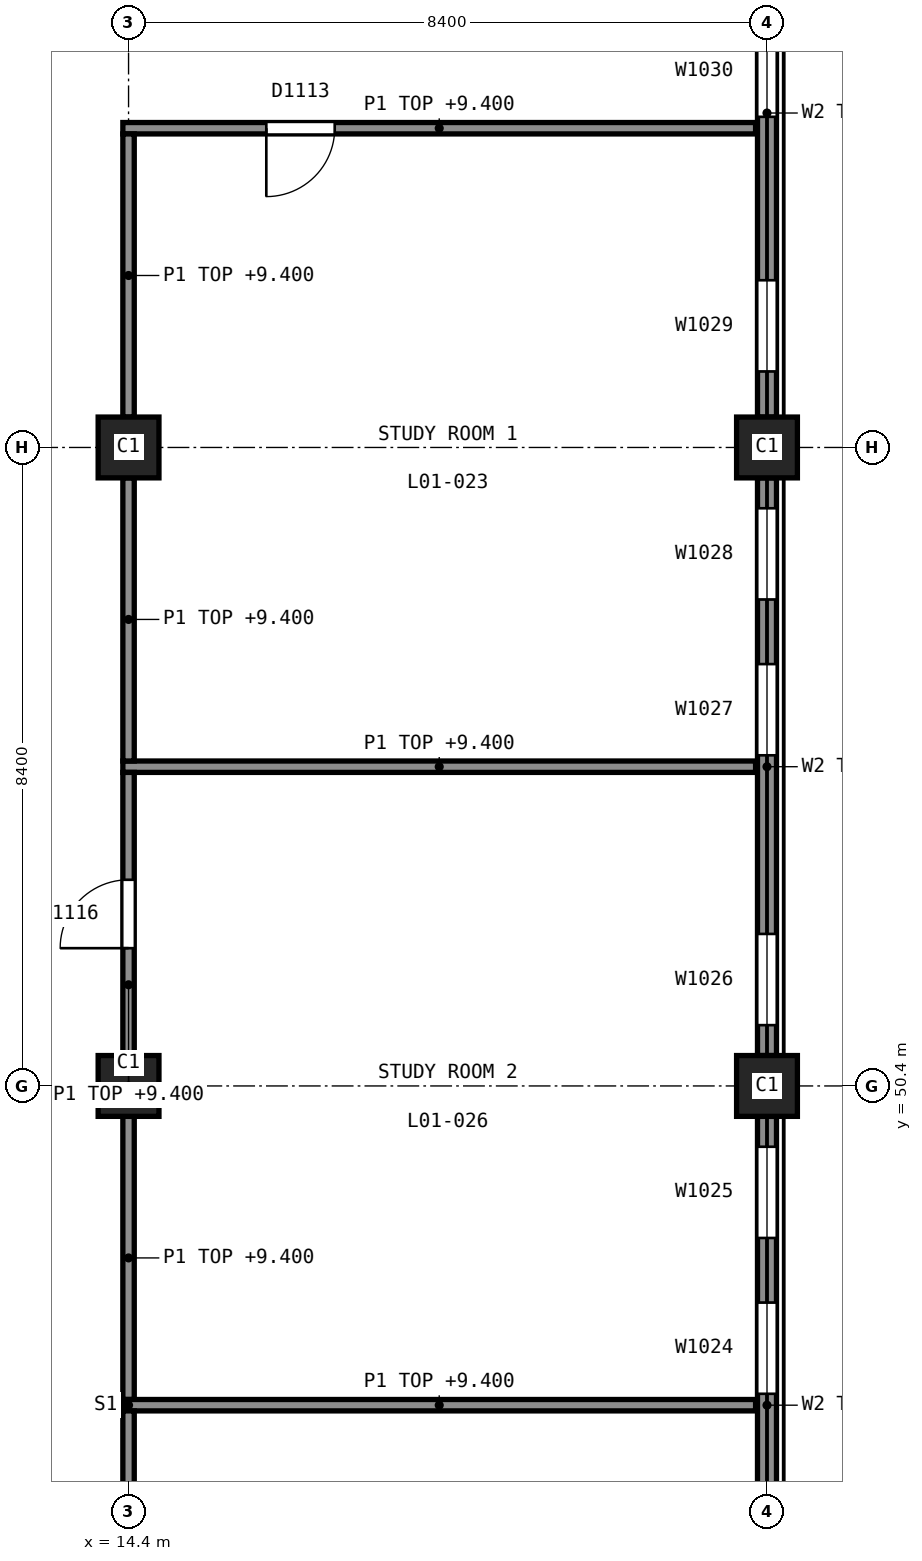
"""IFC4 building model, lengths in metres.
Left out: names, types, materials, properties, quantities, classifications, styles, units other than length and angle.
Written with IfcOpenShell. Run it as: python <this file> out.ifc"""

import sys

from ifc_helpers import new_model, si_unit, direction, frame, frame_2d, origin, origin_2d, place, context, subcontext, project, spatial, rectangle, extrude, element, fill, save


model = new_model("IFC4")
c1 = context("Model", 3, precision=1e-05, world=origin(), true_north=direction((0.0, 1.0)))
c2 = subcontext(c1, "Body", "Model", "MODEL_VIEW")
j1 = project(units=[si_unit("LENGTHUNIT", "METRE"), si_unit("PLANEANGLEUNIT", "RADIAN")], contexts=[c1])
p1 = place(None, origin())
s1 = spatial("IfcSite", under=j1, at=p1, CompositionType="ELEMENT")
p2 = place(p1, origin())
s2 = spatial("IfcBuilding", under=s1, at=p2, CompositionType="ELEMENT")
p3 = place(p2, frame((0.0, 0.0, 5.5)))
s3 = spatial("IfcBuildingStorey", under=s2, at=p3, CompositionType="ELEMENT", Elevation=5.5)
for number, where, z_axis, x_axis in (
    (1, (14.4, 50.4, 0.0), (0.0, 0.0, 1.0), (1.0, 0.0, 0.0)),
    (2, (14.4, 58.8, 0.0), (0.0, 0.0, 1.0), (1.0, 0.0, 0.0)),
    (3, (22.8, 50.4, 0.0), (0.0, 0.0, 1.0), (1.0, 0.0, 0.0)),
    (4, (22.8, 58.8, 0.0), (0.0, 0.0, 1.0), (1.0, 0.0, 0.0)),
):
    element("IfcColumn", number, at=place(p3, frame(where, z_axis=z_axis, x_axis=x_axis)), inside=s3, PredefinedType="COLUMN", context=c2, shape_type="SweptSolid", body=[
        extrude(rectangle(XDim=0.8, YDim=0.8, at=origin_2d()), origin(), (0.0, 0.0, 1.0), 5.0),
    ])
p4 = place(p3, frame((22.8, 42.4, 0.0), z_axis=(0.0, 0.0, 1.0), x_axis=(0.0, 1.0, 0.0)))
e5 = element("IfcWall", 5, at=p4, inside=s3, PredefinedType="SOLIDWALL", context=c2, shape_type="SweptSolid", body=[
    extrude(rectangle(XDim=7.6, YDim=0.25, at=frame_2d((3.8, 0.0))), origin(), (0.0, 0.0, 1.0), 3.94),
])
p5 = place(p4, frame((0.4, 0.0, 0.9)))
e6 = element("IfcOpeningElement", 6, at=p5, cuts=e5, PredefinedType="OPENING", context=c2, shape_type="SweptSolid", body=[
    extrude(rectangle(XDim=1.2, YDim=2.1, at=frame_2d((0.6, 1.05))), frame((0.0, 0.135, 0.0), z_axis=(0.0, -1.0, 0.0), x_axis=(1.0, 0.0, 0.0)), (0.0, 0.0, 1.0), 0.27),
])
p6 = place(p4, frame((3.95, 0.0, 0.9)))
e7 = element("IfcOpeningElement", 7, at=p6, cuts=e5, PredefinedType="OPENING", context=c2, shape_type="SweptSolid", body=[
    extrude(rectangle(XDim=1.2, YDim=2.1, at=frame_2d((0.6, 1.05))), frame((0.0, 0.135, 0.0), z_axis=(0.0, -1.0, 0.0), x_axis=(1.0, 0.0, 0.0)), (0.0, 0.0, 1.0), 0.27),
])
p7 = place(p4, frame((6.0, 0.0, 0.9)))
e8 = element("IfcOpeningElement", 8, at=p7, cuts=e5, PredefinedType="OPENING", context=c2, shape_type="SweptSolid", body=[
    extrude(rectangle(XDim=1.2, YDim=2.1, at=frame_2d((0.6, 1.05))), frame((0.0, 0.135, 0.0), z_axis=(0.0, -1.0, 0.0), x_axis=(1.0, 0.0, 0.0)), (0.0, 0.0, 1.0), 0.27),
])
p8 = place(p3, frame((22.8, 50.8, 0.0), z_axis=(0.0, 0.0, 1.0), x_axis=(0.0, 1.0, 0.0)))
e9 = element("IfcWall", 9, at=p8, inside=s3, PredefinedType="SOLIDWALL", context=c2, shape_type="SweptSolid", body=[
    extrude(rectangle(XDim=7.6, YDim=0.25, at=frame_2d((3.8, 0.0))), origin(), (0.0, 0.0, 1.0), 3.94),
])
p9 = place(p8, frame((0.4, 0.0, 0.9)))
e10 = element("IfcOpeningElement", 10, at=p9, cuts=e9, PredefinedType="OPENING", context=c2, shape_type="SweptSolid", body=[
    extrude(rectangle(XDim=1.2, YDim=2.1, at=frame_2d((0.6, 1.05))), frame((0.0, 0.135, 0.0), z_axis=(0.0, -1.0, 0.0), x_axis=(1.0, 0.0, 0.0)), (0.0, 0.0, 1.0), 0.27),
])
p10 = place(p8, frame((3.95, 0.0, 0.9)))
e11 = element("IfcOpeningElement", 11, at=p10, cuts=e9, PredefinedType="OPENING", context=c2, shape_type="SweptSolid", body=[
    extrude(rectangle(XDim=1.2, YDim=2.1, at=frame_2d((0.6, 1.05))), frame((0.0, 0.135, 0.0), z_axis=(0.0, -1.0, 0.0), x_axis=(1.0, 0.0, 0.0)), (0.0, 0.0, 1.0), 0.27),
])
p11 = place(p8, frame((6.0, 0.0, 0.9)))
e12 = element("IfcOpeningElement", 12, at=p11, cuts=e9, PredefinedType="OPENING", context=c2, shape_type="SweptSolid", body=[
    extrude(rectangle(XDim=1.2, YDim=2.1, at=frame_2d((0.6, 1.05))), frame((0.0, 0.135, 0.0), z_axis=(0.0, -1.0, 0.0), x_axis=(1.0, 0.0, 0.0)), (0.0, 0.0, 1.0), 0.27),
])
p12 = place(p3, frame((22.8, 59.2, 0.0), z_axis=(0.0, 0.0, 1.0), x_axis=(0.0, 1.0, 0.0)))
e13 = element("IfcWall", 13, at=p12, inside=s3, PredefinedType="SOLIDWALL", context=c2, shape_type="SweptSolid", body=[
    extrude(rectangle(XDim=8.0, YDim=0.25, at=frame_2d((4.0, 0.0))), origin(), (0.0, 0.0, 1.0), 3.94),
])
p13 = place(p12, frame((0.6, 0.0, 0.9)))
e14 = element("IfcOpeningElement", 14, at=p13, cuts=e13, PredefinedType="OPENING", context=c2, shape_type="SweptSolid", body=[
    extrude(rectangle(XDim=1.2, YDim=2.1, at=frame_2d((0.6, 1.05))), frame((0.0, 0.135, 0.0), z_axis=(0.0, -1.0, 0.0), x_axis=(1.0, 0.0, 0.0)), (0.0, 0.0, 1.0), 0.27),
])
p14 = place(p12, frame((3.95, 0.0, 0.9)))
e15 = element("IfcOpeningElement", 15, at=p14, cuts=e13, PredefinedType="OPENING", context=c2, shape_type="SweptSolid", body=[
    extrude(rectangle(XDim=1.2, YDim=2.1, at=frame_2d((0.6, 1.05))), frame((0.0, 0.135, 0.0), z_axis=(0.0, -1.0, 0.0), x_axis=(1.0, 0.0, 0.0)), (0.0, 0.0, 1.0), 0.27),
])
p15 = place(p12, frame((6.2, 0.0, 0.9)))
e16 = element("IfcOpeningElement", 16, at=p15, cuts=e13, PredefinedType="OPENING", context=c2, shape_type="SweptSolid", body=[
    extrude(rectangle(XDim=1.2, YDim=2.1, at=frame_2d((0.6, 1.05))), frame((0.0, 0.135, 0.0), z_axis=(0.0, -1.0, 0.0), x_axis=(1.0, 0.0, 0.0)), (0.0, 0.0, 1.0), 0.27),
])
p16 = place(p3, frame((14.325, 54.6, 0.0), z_axis=(0.0, 0.0, 1.0), x_axis=(1.0, 0.0, 0.0)))
e17 = element("IfcWall", 17, at=p16, inside=s3, PredefinedType="PARTITIONING", context=c2, shape_type="SweptSolid", body=[
    extrude(rectangle(XDim=8.325, YDim=0.15, at=frame_2d((4.163, 0.0))), origin(), (0.0, 0.0, 1.0), 3.9),
])
p17 = place(p3, frame((14.325, 63.0, 0.0), z_axis=(0.0, 0.0, 1.0), x_axis=(1.0, 0.0, 0.0)))
e18 = element("IfcWall", 18, at=p17, inside=s3, PredefinedType="PARTITIONING", context=c2, shape_type="SweptSolid", body=[
    extrude(rectangle(XDim=8.325, YDim=0.15, at=frame_2d((4.163, 0.0))), origin(), (0.0, 0.0, 1.0), 3.9),
])
p18 = place(p17, frame((1.887, 0.0, 0.0)))
e19 = element("IfcOpeningElement", 19, at=p18, cuts=e18, PredefinedType="OPENING", context=c2, shape_type="SweptSolid", body=[
    extrude(rectangle(XDim=0.9, YDim=2.1, at=frame_2d((0.45, 1.05))), frame((0.0, 0.085, 0.0), z_axis=(0.0, -1.0, 0.0), x_axis=(1.0, 0.0, 0.0)), (0.0, 0.0, 1.0), 0.17),
])
p19 = place(p3, frame((14.4, 54.675, 0.0), z_axis=(0.0, 0.0, 1.0), x_axis=(0.0, 1.0, 0.0)))
e20 = element("IfcWall", 20, at=p19, inside=s3, PredefinedType="PARTITIONING", context=c2, shape_type="SweptSolid", body=[
    extrude(rectangle(XDim=3.725, YDim=0.15, at=frame_2d((1.862, 0.0))), origin(), (0.0, 0.0, 1.0), 3.9),
])
for number, where, z_axis, x_axis in (
    (21, (14.4, 59.2, 0.0), (0.0, 0.0, 1.0), (0.0, 1.0, 0.0)),
    (22, (14.4, 46.275, 0.0), (0.0, 0.0, 1.0), (0.0, 1.0, 0.0)),
):
    element("IfcWall", number, at=place(p3, frame(where, z_axis=z_axis, x_axis=x_axis)), inside=s3, PredefinedType="PARTITIONING", context=c2, shape_type="SweptSolid", body=[
        extrude(rectangle(XDim=3.725, YDim=0.15, at=frame_2d((1.863, 0.0))), origin(), (0.0, 0.0, 1.0), 3.9),
    ])
p20 = place(p3, frame((14.4, 50.8, 0.0), z_axis=(0.0, 0.0, 1.0), x_axis=(0.0, 1.0, 0.0)))
e23 = element("IfcWall", 23, at=p20, inside=s3, PredefinedType="PARTITIONING", context=c2, shape_type="SweptSolid", body=[
    extrude(rectangle(XDim=3.725, YDim=0.15, at=frame_2d((1.862, 0.0))), origin(), (0.0, 0.0, 1.0), 3.9),
])
p21 = place(p20, frame((1.413, 0.0, 0.0)))
e24 = element("IfcOpeningElement", 24, at=p21, cuts=e23, PredefinedType="OPENING", context=c2, shape_type="SweptSolid", body=[
    extrude(rectangle(XDim=0.9, YDim=2.1, at=frame_2d((0.45, 1.05))), frame((0.0, 0.085, 0.0), z_axis=(0.0, -1.0, 0.0), x_axis=(1.0, 0.0, 0.0)), (0.0, 0.0, 1.0), 0.17),
])
p22 = place(p3, frame((14.325, 46.2, 0.0), z_axis=(0.0, 0.0, 1.0), x_axis=(1.0, 0.0, 0.0)))
e25 = element("IfcWall", 25, at=p22, inside=s3, PredefinedType="PARTITIONING", context=c2, shape_type="SweptSolid", body=[
    extrude(rectangle(XDim=8.325, YDim=0.15, at=frame_2d((4.163, 0.0))), origin(), (0.0, 0.0, 1.0), 3.9),
])
p23 = place(p3, frame((14.4, 42.4, 0.0), z_axis=(0.0, 0.0, 1.0), x_axis=(0.0, 1.0, 0.0)))
e26 = element("IfcWall", 26, at=p23, inside=s3, PredefinedType="PARTITIONING", context=c2, shape_type="SweptSolid", body=[
    extrude(rectangle(XDim=3.725, YDim=0.15, at=frame_2d((1.863, 0.0))), origin(), (0.0, 0.0, 1.0), 3.9),
])
p24 = place(p6, origin())
e27 = element("IfcWindow", 27, at=p24, inside=s3, PartitioningType="SINGLE_PANEL", PredefinedType="WINDOW", context=c2, shape_type="SweptSolid", body=[
    extrude(rectangle(XDim=1.2, YDim=2.1, at=frame_2d((0.6, 1.05))), frame((0.0, 0.105, 0.0), z_axis=(0.0, -1.0, 0.0), x_axis=(1.0, 0.0, 0.0)), (0.0, 0.0, 1.0), 0.06),
])
fill(e7, e27)
p25 = place(p7, origin())
e28 = element("IfcWindow", 28, at=p25, inside=s3, PartitioningType="SINGLE_PANEL", PredefinedType="WINDOW", context=c2, shape_type="SweptSolid", body=[
    extrude(rectangle(XDim=1.2, YDim=2.1, at=frame_2d((0.6, 1.05))), frame((0.0, 0.105, 0.0), z_axis=(0.0, -1.0, 0.0), x_axis=(1.0, 0.0, 0.0)), (0.0, 0.0, 1.0), 0.06),
])
fill(e8, e28)
p26 = place(p9, origin())
e29 = element("IfcWindow", 29, at=p26, inside=s3, PartitioningType="SINGLE_PANEL", PredefinedType="WINDOW", context=c2, shape_type="SweptSolid", body=[
    extrude(rectangle(XDim=1.2, YDim=2.1, at=frame_2d((0.6, 1.05))), frame((0.0, 0.105, 0.0), z_axis=(0.0, -1.0, 0.0), x_axis=(1.0, 0.0, 0.0)), (0.0, 0.0, 1.0), 0.06),
])
fill(e10, e29)
p27 = place(p10, origin())
e30 = element("IfcWindow", 30, at=p27, inside=s3, PartitioningType="SINGLE_PANEL", PredefinedType="WINDOW", context=c2, shape_type="SweptSolid", body=[
    extrude(rectangle(XDim=1.2, YDim=2.1, at=frame_2d((0.6, 1.05))), frame((0.0, 0.105, 0.0), z_axis=(0.0, -1.0, 0.0), x_axis=(1.0, 0.0, 0.0)), (0.0, 0.0, 1.0), 0.06),
])
fill(e11, e30)
p28 = place(p11, origin())
e31 = element("IfcWindow", 31, at=p28, inside=s3, PartitioningType="SINGLE_PANEL", PredefinedType="WINDOW", context=c2, shape_type="SweptSolid", body=[
    extrude(rectangle(XDim=1.2, YDim=2.1, at=frame_2d((0.6, 1.05))), frame((0.0, 0.105, 0.0), z_axis=(0.0, -1.0, 0.0), x_axis=(1.0, 0.0, 0.0)), (0.0, 0.0, 1.0), 0.06),
])
fill(e12, e31)
p29 = place(p13, origin())
e32 = element("IfcWindow", 32, at=p29, inside=s3, PartitioningType="SINGLE_PANEL", PredefinedType="WINDOW", context=c2, shape_type="SweptSolid", body=[
    extrude(rectangle(XDim=1.2, YDim=2.1, at=frame_2d((0.6, 1.05))), frame((0.0, 0.105, 0.0), z_axis=(0.0, -1.0, 0.0), x_axis=(1.0, 0.0, 0.0)), (0.0, 0.0, 1.0), 0.06),
])
fill(e14, e32)
p30 = place(p14, origin())
e33 = element("IfcWindow", 33, at=p30, inside=s3, PartitioningType="SINGLE_PANEL", PredefinedType="WINDOW", context=c2, shape_type="SweptSolid", body=[
    extrude(rectangle(XDim=1.2, YDim=2.1, at=frame_2d((0.6, 1.05))), frame((0.0, 0.105, 0.0), z_axis=(0.0, -1.0, 0.0), x_axis=(1.0, 0.0, 0.0)), (0.0, 0.0, 1.0), 0.06),
])
fill(e15, e33)
p31 = place(p18, origin())
e34 = element("IfcDoor", 34, at=p31, inside=s3, OperationType="SINGLE_SWING_LEFT", PredefinedType="DOOR", context=c2, shape_type="SweptSolid", body=[
    extrude(rectangle(XDim=0.9, YDim=2.1, at=frame_2d((0.45, 1.05))), frame((0.0, 0.025, 0.0), z_axis=(0.0, -1.0, 0.0), x_axis=(1.0, 0.0, 0.0)), (0.0, 0.0, 1.0), 0.05),
])
fill(e19, e34)
p32 = place(p21, origin())
e35 = element("IfcDoor", 35, at=p32, inside=s3, OperationType="SINGLE_SWING_RIGHT", PredefinedType="DOOR", context=c2, shape_type="SweptSolid", body=[
    extrude(rectangle(XDim=0.9, YDim=2.1, at=frame_2d((0.45, 1.05))), frame((0.0, 0.025, 0.0), z_axis=(0.0, -1.0, 0.0), x_axis=(1.0, 0.0, 0.0)), (0.0, 0.0, 1.0), 0.05),
])
fill(e24, e35)
save(model, sys.argv[1])
